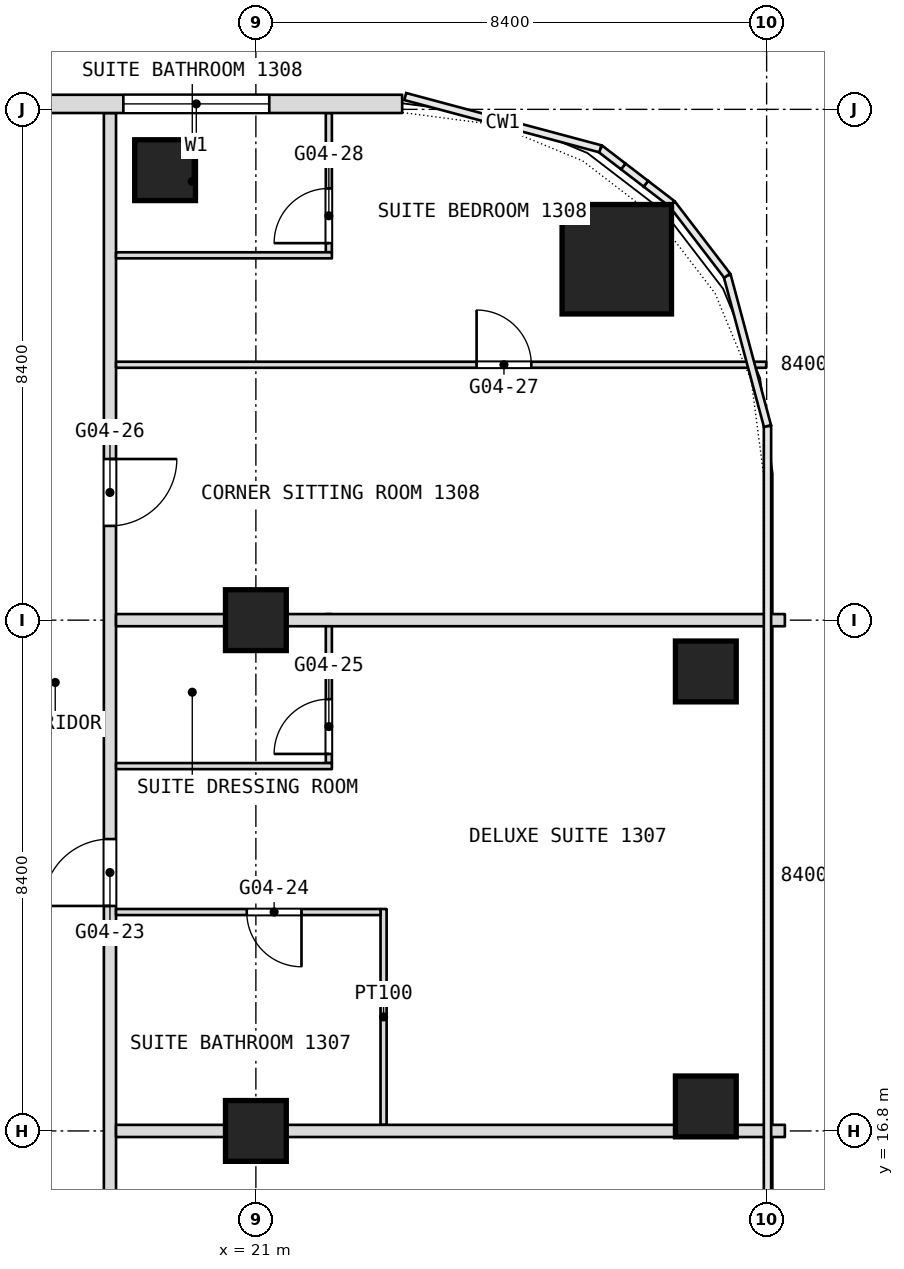
"""IFC4 building model, lengths in metres.
Left out: names, types, materials, properties, quantities, classifications, styles, units other than length and angle.
Written with IfcOpenShell. Run it as: python <this file> out.ifc"""

import sys

from ifc_helpers import new_model, si_unit, direction, frame, frame_2d, origin, origin_2d, place, context, subcontext, project, spatial, rectangle, extrude, element, fill, save


model = new_model("IFC4")
c1 = context("Model", 3, precision=1e-05, world=origin(), true_north=direction((0.0, 1.0)))
c2 = subcontext(c1, "Body", "Model", "MODEL_VIEW")
j1 = project(units=[si_unit("LENGTHUNIT", "METRE"), si_unit("PLANEANGLEUNIT", "RADIAN")], contexts=[c1])
p1 = place(None, origin())
s1 = spatial("IfcSite", under=j1, at=p1, CompositionType="ELEMENT")
p2 = place(p1, origin())
s2 = spatial("IfcBuilding", under=s1, at=p2, CompositionType="ELEMENT")
p3 = place(p2, frame((0.0, 0.0, 61.7)))
s3 = spatial("IfcBuildingStorey", under=s2, at=p3, CompositionType="ELEMENT", Elevation=61.7)
p4 = place(p3, frame((26.936, 31.135, 0.0), z_axis=(0.0, 0.0, 1.0), x_axis=(1.0, 0.0, 0.0)))
e1 = element("IfcColumn", 1, at=p4, inside=s3, PredefinedType="COLUMN", context=c2, shape_type="SweptSolid", body=[
    extrude(rectangle(XDim=1.8, YDim=1.8, at=origin_2d()), origin(), (0.0, 0.0, 1.0), 3.6),
])
for number, where, z_axis, x_axis in (
    (2, (21.0, 16.8, 0.0), (0.0, 0.0, 1.0), (1.0, 0.0, 0.0)),
    (3, (21.0, 25.2, 0.0), (0.0, 0.0, 1.0), (1.0, 0.0, 0.0)),
    (4, (19.507, 32.6, 0.0), (0.0, 0.0, 1.0), (1.0, 0.0, 0.0)),
    (5, (28.4, 24.356, 0.0), (0.0, 0.0, 1.0), (1.0, 0.0, 0.0)),
    (6, (28.4, 17.203, 0.0), (0.0, 0.0, 1.0), (1.0, 0.0, 0.0)),
):
    element("IfcColumn", number, at=place(p3, frame(where, z_axis=z_axis, x_axis=x_axis)), inside=s3, PredefinedType="COLUMN", context=c2, shape_type="SweptSolid", body=[
        extrude(rectangle(XDim=1.0, YDim=1.0, at=origin_2d()), origin(), (0.0, 0.0, 1.0), 3.6),
    ])
p5 = place(p3, frame((23.1, 16.9, 0.0), z_axis=(0.0, 0.0, 1.0), x_axis=(0.0, 1.0, 0.0)))
e7 = element("IfcWall", 7, at=p5, inside=s3, PredefinedType="PARTITIONING", context=c2, shape_type="SweptSolid", body=[
    extrude(rectangle(XDim=3.55, YDim=0.1, at=frame_2d((1.775, 0.0))), origin(), (0.0, 0.0, 1.0), 3.34),
])
p6 = place(p3, frame((22.2, 22.85, 0.0), z_axis=(0.0, 0.0, 1.0), x_axis=(0.0, 1.0, 0.0)))
e8 = element("IfcWall", 8, at=p6, inside=s3, PredefinedType="PARTITIONING", context=c2, shape_type="SweptSolid", body=[
    extrude(rectangle(XDim=2.45, YDim=0.1, at=frame_2d((1.225, 0.0))), origin(), (0.0, 0.0, 1.0), 3.34),
])
p7 = place(p6, frame((0.15, 0.0, 0.0)))
e9 = element("IfcOpeningElement", 9, at=p7, cuts=e8, PredefinedType="OPENING", context=c2, shape_type="SweptSolid", body=[
    extrude(rectangle(XDim=0.9, YDim=2.1, at=frame_2d((0.45, 1.05))), frame((0.0, 0.05, 0.0), z_axis=(0.0, -1.0, 0.0), x_axis=(1.0, 0.0, 0.0)), (0.0, 0.0, 1.0), 0.1),
])
p8 = place(p3, frame((22.2, 31.25, 0.0), z_axis=(0.0, 0.0, 1.0), x_axis=(0.0, 1.0, 0.0)))
e10 = element("IfcWall", 10, at=p8, inside=s3, PredefinedType="PARTITIONING", context=c2, shape_type="SweptSolid", body=[
    extrude(rectangle(XDim=2.29, YDim=0.1, at=frame_2d((1.145, 0.0))), origin(), (0.0, 0.0, 1.0), 3.34),
])
p9 = place(p8, frame((0.15, 0.0, 0.0)))
e11 = element("IfcOpeningElement", 11, at=p9, cuts=e10, PredefinedType="OPENING", context=c2, shape_type="SweptSolid", body=[
    extrude(rectangle(XDim=0.9, YDim=2.1, at=frame_2d((0.45, 1.05))), frame((0.0, 0.05, 0.0), z_axis=(0.0, -1.0, 0.0), x_axis=(1.0, 0.0, 0.0)), (0.0, 0.0, 1.0), 0.1),
])
p10 = place(p3, frame((18.6, -16.665, 0.0), z_axis=(0.0, 0.0, 1.0), x_axis=(0.0, 1.0, 0.0)))
e12 = element("IfcWall", 12, at=p10, inside=s3, PredefinedType="PARTITIONING", context=c2, shape_type="SweptSolid", body=[
    extrude(rectangle(XDim=50.205, YDim=0.2, at=frame_2d((25.103, 0.0))), origin(), (0.0, 0.0, 1.0), 3.34),
])
p11 = place(p10, frame((2.991, 0.0, 0.0)))
e13 = element("IfcOpeningElement", 13, at=p11, cuts=e12, PredefinedType="OPENING", context=c2, shape_type="SweptSolid", body=[
    extrude(rectangle(XDim=1.0, YDim=2.1, at=frame_2d((0.5, 1.05))), frame((0.0, 0.1, 0.0), z_axis=(0.0, -1.0, 0.0), x_axis=(1.0, 0.0, 0.0)), (0.0, 0.0, 1.0), 0.2),
])
p12 = place(p10, frame((4.574, 0.0, 0.0)))
e14 = element("IfcOpeningElement", 14, at=p12, cuts=e12, PredefinedType="OPENING", context=c2, shape_type="SweptSolid", body=[
    extrude(rectangle(XDim=1.0, YDim=2.1, at=frame_2d((0.5, 1.05))), frame((0.0, 0.1, 0.0), z_axis=(0.0, -1.0, 0.0), x_axis=(1.0, 0.0, 0.0)), (0.0, 0.0, 1.0), 0.2),
])
p13 = place(p10, frame((8.665, 0.0, 0.0)))
e15 = element("IfcOpeningElement", 15, at=p13, cuts=e12, PredefinedType="OPENING", context=c2, shape_type="SweptSolid", body=[
    extrude(rectangle(XDim=1.0, YDim=2.1, at=frame_2d((0.5, 1.05))), frame((0.0, 0.1, 0.0), z_axis=(0.0, -1.0, 0.0), x_axis=(1.0, 0.0, 0.0)), (0.0, 0.0, 1.0), 0.2),
])
p14 = place(p10, frame((15.265, 0.0, 0.0)))
e16 = element("IfcOpeningElement", 16, at=p14, cuts=e12, PredefinedType="OPENING", context=c2, shape_type="SweptSolid", body=[
    extrude(rectangle(XDim=1.0, YDim=2.1, at=frame_2d((0.5, 1.05))), frame((0.0, 0.1, 0.0), z_axis=(0.0, -1.0, 0.0), x_axis=(1.0, 0.0, 0.0)), (0.0, 0.0, 1.0), 0.2),
])
p15 = place(p10, frame((19.465, 0.0, 0.0)))
e17 = element("IfcOpeningElement", 17, at=p15, cuts=e12, PredefinedType="OPENING", context=c2, shape_type="SweptSolid", body=[
    extrude(rectangle(XDim=1.0, YDim=2.1, at=frame_2d((0.5, 1.05))), frame((0.0, 0.1, 0.0), z_axis=(0.0, -1.0, 0.0), x_axis=(1.0, 0.0, 0.0)), (0.0, 0.0, 1.0), 0.2),
])
p16 = place(p10, frame((21.265, 0.0, 0.0)))
e18 = element("IfcOpeningElement", 18, at=p16, cuts=e12, PredefinedType="OPENING", context=c2, shape_type="SweptSolid", body=[
    extrude(rectangle(XDim=1.0, YDim=2.1, at=frame_2d((0.5, 1.05))), frame((0.0, 0.1, 0.0), z_axis=(0.0, -1.0, 0.0), x_axis=(1.0, 0.0, 0.0)), (0.0, 0.0, 1.0), 0.2),
])
p17 = place(p10, frame((28.365, 0.0, 0.0)))
e19 = element("IfcOpeningElement", 19, at=p17, cuts=e12, PredefinedType="OPENING", context=c2, shape_type="SweptSolid", body=[
    extrude(rectangle(XDim=1.8, YDim=2.1, at=frame_2d((0.9, 1.05))), frame((0.0, 0.1, 0.0), z_axis=(0.0, -1.0, 0.0), x_axis=(1.0, 0.0, 0.0)), (0.0, 0.0, 1.0), 0.2),
])
p18 = place(p10, frame((37.165, 0.0, 0.0)))
e20 = element("IfcOpeningElement", 20, at=p18, cuts=e12, PredefinedType="OPENING", context=c2, shape_type="SweptSolid", body=[
    extrude(rectangle(XDim=1.1, YDim=2.1, at=frame_2d((0.55, 1.05))), frame((0.0, 0.1, 0.0), z_axis=(0.0, -1.0, 0.0), x_axis=(1.0, 0.0, 0.0)), (0.0, 0.0, 1.0), 0.2),
])
p19 = place(p10, frame((43.415, 0.0, 0.0)))
e21 = element("IfcOpeningElement", 21, at=p19, cuts=e12, PredefinedType="OPENING", context=c2, shape_type="SweptSolid", body=[
    extrude(rectangle(XDim=1.1, YDim=2.1, at=frame_2d((0.55, 1.05))), frame((0.0, 0.1, 0.0), z_axis=(0.0, -1.0, 0.0), x_axis=(1.0, 0.0, 0.0)), (0.0, 0.0, 1.0), 0.2),
])
p20 = place(p3, frame((18.7, 16.8, 0.0), z_axis=(0.0, 0.0, 1.0), x_axis=(1.0, 0.0, 0.0)))
e22 = element("IfcWall", 22, at=p20, inside=s3, PredefinedType="PARTITIONING", context=c2, shape_type="SweptSolid", body=[
    extrude(rectangle(XDim=11.0, YDim=0.2, at=frame_2d((5.5, 0.0))), origin(), (0.0, 0.0, 1.0), 2.84),
])
p21 = place(p3, frame((18.7, 20.4, 0.0), z_axis=(0.0, 0.0, 1.0), x_axis=(1.0, 0.0, 0.0)))
e23 = element("IfcWall", 23, at=p21, inside=s3, PredefinedType="PARTITIONING", context=c2, shape_type="SweptSolid", body=[
    extrude(rectangle(XDim=4.35, YDim=0.1, at=frame_2d((2.175, 0.0))), origin(), (0.0, 0.0, 1.0), 3.34),
])
p22 = place(p21, frame((2.15, 0.0, 0.0)))
e24 = element("IfcOpeningElement", 24, at=p22, cuts=e23, PredefinedType="OPENING", context=c2, shape_type="SweptSolid", body=[
    extrude(rectangle(XDim=0.9, YDim=2.1, at=frame_2d((0.45, 1.05))), frame((0.0, 0.05, 0.0), z_axis=(0.0, -1.0, 0.0), x_axis=(1.0, 0.0, 0.0)), (0.0, 0.0, 1.0), 0.1),
])
p23 = place(p3, frame((18.7, 22.8, 0.0), z_axis=(0.0, 0.0, 1.0), x_axis=(1.0, 0.0, 0.0)))
e25 = element("IfcWall", 25, at=p23, inside=s3, PredefinedType="PARTITIONING", context=c2, shape_type="SweptSolid", body=[
    extrude(rectangle(XDim=3.55, YDim=0.1, at=frame_2d((1.775, 0.0))), origin(), (0.0, 0.0, 1.0), 3.34),
])
p24 = place(p3, frame((18.7, 25.2, 0.0), z_axis=(0.0, 0.0, 1.0), x_axis=(1.0, 0.0, 0.0)))
e26 = element("IfcWall", 26, at=p24, inside=s3, PredefinedType="PARTITIONING", context=c2, shape_type="SweptSolid", body=[
    extrude(rectangle(XDim=11.0, YDim=0.2, at=frame_2d((5.5, 0.0))), origin(), (0.0, 0.0, 1.0), 2.84),
])
p25 = place(p3, frame((18.7, 29.4, 0.0), z_axis=(0.0, 0.0, 1.0), x_axis=(1.0, 0.0, 0.0)))
e27 = element("IfcWall", 27, at=p25, inside=s3, PredefinedType="PARTITIONING", context=c2, shape_type="SweptSolid", body=[
    extrude(rectangle(XDim=10.693, YDim=0.1, at=frame_2d((5.347, 0.0))), origin(), (0.0, 0.0, 1.0), 3.34),
])
p26 = place(p25, frame((5.93, 0.0, 0.0)))
e28 = element("IfcOpeningElement", 28, at=p26, cuts=e27, PredefinedType="OPENING", context=c2, shape_type="SweptSolid", body=[
    extrude(rectangle(XDim=0.9, YDim=2.1, at=frame_2d((0.45, 1.05))), frame((0.0, 0.05, 0.0), z_axis=(0.0, -1.0, 0.0), x_axis=(1.0, 0.0, 0.0)), (0.0, 0.0, 1.0), 0.1),
])
p27 = place(p3, frame((18.7, 31.2, 0.0), z_axis=(0.0, 0.0, 1.0), x_axis=(1.0, 0.0, 0.0)))
e29 = element("IfcWall", 29, at=p27, inside=s3, PredefinedType="PARTITIONING", context=c2, shape_type="SweptSolid", body=[
    extrude(rectangle(XDim=3.55, YDim=0.1, at=frame_2d((1.775, 0.0))), origin(), (0.0, 0.0, 1.0), 3.34),
])
p28 = place(p3, frame((23.406, 33.69, 0.0), z_axis=(0.0, 0.0, 1.0), x_axis=(-1.0, 0.0, 0.0)))
e30 = element("IfcWall", 30, at=p28, inside=s3, PredefinedType="NOTDEFINED", context=c2, shape_type="SweptSolid", body=[
    extrude(rectangle(XDim=46.812, YDim=0.3, at=frame_2d((23.406, 0.0))), origin(), (0.0, 0.0, 1.0), 3.6),
])
p29 = place(p28, frame((2.186, 0.0, 0.9)))
e31 = element("IfcOpeningElement", 31, at=p29, cuts=e30, PredefinedType="OPENING", context=c2, shape_type="SweptSolid", body=[
    extrude(rectangle(XDim=2.4, YDim=2.1, at=frame_2d((1.2, 1.05))), frame((0.0, 0.15, 0.0), z_axis=(0.0, -1.0, 0.0), x_axis=(1.0, 0.0, 0.0)), (0.0, 0.0, 1.0), 0.3),
])
p30 = place(p28, frame((7.506, 0.0, 0.9)))
e32 = element("IfcOpeningElement", 32, at=p30, cuts=e30, PredefinedType="OPENING", context=c2, shape_type="SweptSolid", body=[
    extrude(rectangle(XDim=2.4, YDim=2.1, at=frame_2d((1.2, 1.05))), frame((0.0, 0.15, 0.0), z_axis=(0.0, -1.0, 0.0), x_axis=(1.0, 0.0, 0.0)), (0.0, 0.0, 1.0), 0.3),
])
p31 = place(p28, frame((11.706, 0.0, 0.9)))
e33 = element("IfcOpeningElement", 33, at=p31, cuts=e30, PredefinedType="OPENING", context=c2, shape_type="SweptSolid", body=[
    extrude(rectangle(XDim=2.4, YDim=2.1, at=frame_2d((1.2, 1.05))), frame((0.0, 0.15, 0.0), z_axis=(0.0, -1.0, 0.0), x_axis=(1.0, 0.0, 0.0)), (0.0, 0.0, 1.0), 0.3),
])
p32 = place(p28, frame((15.906, 0.0, 0.9)))
e34 = element("IfcOpeningElement", 34, at=p32, cuts=e30, PredefinedType="OPENING", context=c2, shape_type="SweptSolid", body=[
    extrude(rectangle(XDim=2.4, YDim=2.1, at=frame_2d((1.2, 1.05))), frame((0.0, 0.15, 0.0), z_axis=(0.0, -1.0, 0.0), x_axis=(1.0, 0.0, 0.0)), (0.0, 0.0, 1.0), 0.3),
])
p33 = place(p28, frame((20.106, 0.0, 0.9)))
e35 = element("IfcOpeningElement", 35, at=p33, cuts=e30, PredefinedType="OPENING", context=c2, shape_type="SweptSolid", body=[
    extrude(rectangle(XDim=2.4, YDim=2.1, at=frame_2d((1.2, 1.05))), frame((0.0, 0.15, 0.0), z_axis=(0.0, -1.0, 0.0), x_axis=(1.0, 0.0, 0.0)), (0.0, 0.0, 1.0), 0.3),
])
p34 = place(p28, frame((24.306, 0.0, 0.9)))
e36 = element("IfcOpeningElement", 36, at=p34, cuts=e30, PredefinedType="OPENING", context=c2, shape_type="SweptSolid", body=[
    extrude(rectangle(XDim=2.4, YDim=2.1, at=frame_2d((1.2, 1.05))), frame((0.0, 0.15, 0.0), z_axis=(0.0, -1.0, 0.0), x_axis=(1.0, 0.0, 0.0)), (0.0, 0.0, 1.0), 0.3),
])
p35 = place(p28, frame((28.506, 0.0, 0.9)))
e37 = element("IfcOpeningElement", 37, at=p35, cuts=e30, PredefinedType="OPENING", context=c2, shape_type="SweptSolid", body=[
    extrude(rectangle(XDim=2.4, YDim=2.1, at=frame_2d((1.2, 1.05))), frame((0.0, 0.15, 0.0), z_axis=(0.0, -1.0, 0.0), x_axis=(1.0, 0.0, 0.0)), (0.0, 0.0, 1.0), 0.3),
])
p36 = place(p28, frame((32.706, 0.0, 0.9)))
e38 = element("IfcOpeningElement", 38, at=p36, cuts=e30, PredefinedType="OPENING", context=c2, shape_type="SweptSolid", body=[
    extrude(rectangle(XDim=2.4, YDim=2.1, at=frame_2d((1.2, 1.05))), frame((0.0, 0.15, 0.0), z_axis=(0.0, -1.0, 0.0), x_axis=(1.0, 0.0, 0.0)), (0.0, 0.0, 1.0), 0.3),
])
p37 = place(p28, frame((36.906, 0.0, 0.9)))
e39 = element("IfcOpeningElement", 39, at=p37, cuts=e30, PredefinedType="OPENING", context=c2, shape_type="SweptSolid", body=[
    extrude(rectangle(XDim=2.4, YDim=2.1, at=frame_2d((1.2, 1.05))), frame((0.0, 0.15, 0.0), z_axis=(0.0, -1.0, 0.0), x_axis=(1.0, 0.0, 0.0)), (0.0, 0.0, 1.0), 0.3),
])
p38 = place(p28, frame((42.226, 0.0, 0.9)))
e40 = element("IfcOpeningElement", 40, at=p38, cuts=e30, PredefinedType="OPENING", context=c2, shape_type="SweptSolid", body=[
    extrude(rectangle(XDim=2.4, YDim=2.1, at=frame_2d((1.2, 1.05))), frame((0.0, 0.15, 0.0), z_axis=(0.0, -1.0, 0.0), x_axis=(1.0, 0.0, 0.0)), (0.0, 0.0, 1.0), 0.3),
])
p39 = place(p7, origin())
e41 = element("IfcDoor", 41, at=p39, inside=s3, OperationType="SINGLE_SWING_LEFT", PredefinedType="DOOR", context=c2, shape_type="SweptSolid", body=[
    extrude(rectangle(XDim=0.9, YDim=2.1, at=frame_2d((0.45, 1.05))), frame((0.0, 0.025, 0.0), z_axis=(0.0, -1.0, 0.0), x_axis=(1.0, 0.0, 0.0)), (0.0, 0.0, 1.0), 0.05),
])
fill(e9, e41)
p40 = place(p9, origin())
e42 = element("IfcDoor", 42, at=p40, inside=s3, OperationType="SINGLE_SWING_LEFT", PredefinedType="DOOR", context=c2, shape_type="SweptSolid", body=[
    extrude(rectangle(XDim=0.9, YDim=2.1, at=frame_2d((0.45, 1.05))), frame((0.0, 0.025, 0.0), z_axis=(0.0, -1.0, 0.0), x_axis=(1.0, 0.0, 0.0)), (0.0, 0.0, 1.0), 0.05),
])
fill(e11, e42)
p41 = place(p18, origin())
e43 = element("IfcDoor", 43, at=p41, inside=s3, OperationType="SINGLE_SWING_RIGHT", PredefinedType="DOOR", context=c2, shape_type="SweptSolid", body=[
    extrude(rectangle(XDim=1.1, YDim=2.1, at=frame_2d((0.55, 1.05))), frame((0.0, 0.025, 0.0), z_axis=(0.0, -1.0, 0.0), x_axis=(1.0, 0.0, 0.0)), (0.0, 0.0, 1.0), 0.05),
])
fill(e20, e43)
p42 = place(p19, origin())
e44 = element("IfcDoor", 44, at=p42, inside=s3, OperationType="SINGLE_SWING_RIGHT", PredefinedType="DOOR", context=c2, shape_type="SweptSolid", body=[
    extrude(rectangle(XDim=1.1, YDim=2.1, at=frame_2d((0.55, 1.05))), frame((0.0, 0.025, 0.0), z_axis=(0.0, -1.0, 0.0), x_axis=(1.0, 0.0, 0.0)), (0.0, 0.0, 1.0), 0.05),
])
fill(e21, e44)
p43 = place(p22, origin())
e45 = element("IfcDoor", 45, at=p43, inside=s3, OperationType="SINGLE_SWING_LEFT", PredefinedType="DOOR", context=c2, shape_type="SweptSolid", body=[
    extrude(rectangle(XDim=0.9, YDim=2.1, at=frame_2d((0.45, 1.05))), frame((0.0, 0.025, 0.0), z_axis=(0.0, -1.0, 0.0), x_axis=(1.0, 0.0, 0.0)), (0.0, 0.0, 1.0), 0.05),
])
fill(e24, e45)
p44 = place(p26, origin())
e46 = element("IfcDoor", 46, at=p44, inside=s3, OperationType="SINGLE_SWING_RIGHT", PredefinedType="DOOR", context=c2, shape_type="SweptSolid", body=[
    extrude(rectangle(XDim=0.9, YDim=2.1, at=frame_2d((0.45, 1.05))), frame((0.0, 0.025, 0.0), z_axis=(0.0, -1.0, 0.0), x_axis=(1.0, 0.0, 0.0)), (0.0, 0.0, 1.0), 0.05),
])
fill(e28, e46)
p45 = place(p29, origin())
e47 = element("IfcWindow", 47, at=p45, inside=s3, PartitioningType="SINGLE_PANEL", PredefinedType="WINDOW", context=c2, shape_type="SweptSolid", body=[
    extrude(rectangle(XDim=2.4, YDim=2.1, at=frame_2d((1.2, 1.05))), frame((0.0, 0.03, 0.0), z_axis=(0.0, -1.0, 0.0), x_axis=(1.0, 0.0, 0.0)), (0.0, 0.0, 1.0), 0.06),
])
fill(e31, e47)
save(model, sys.argv[1])
